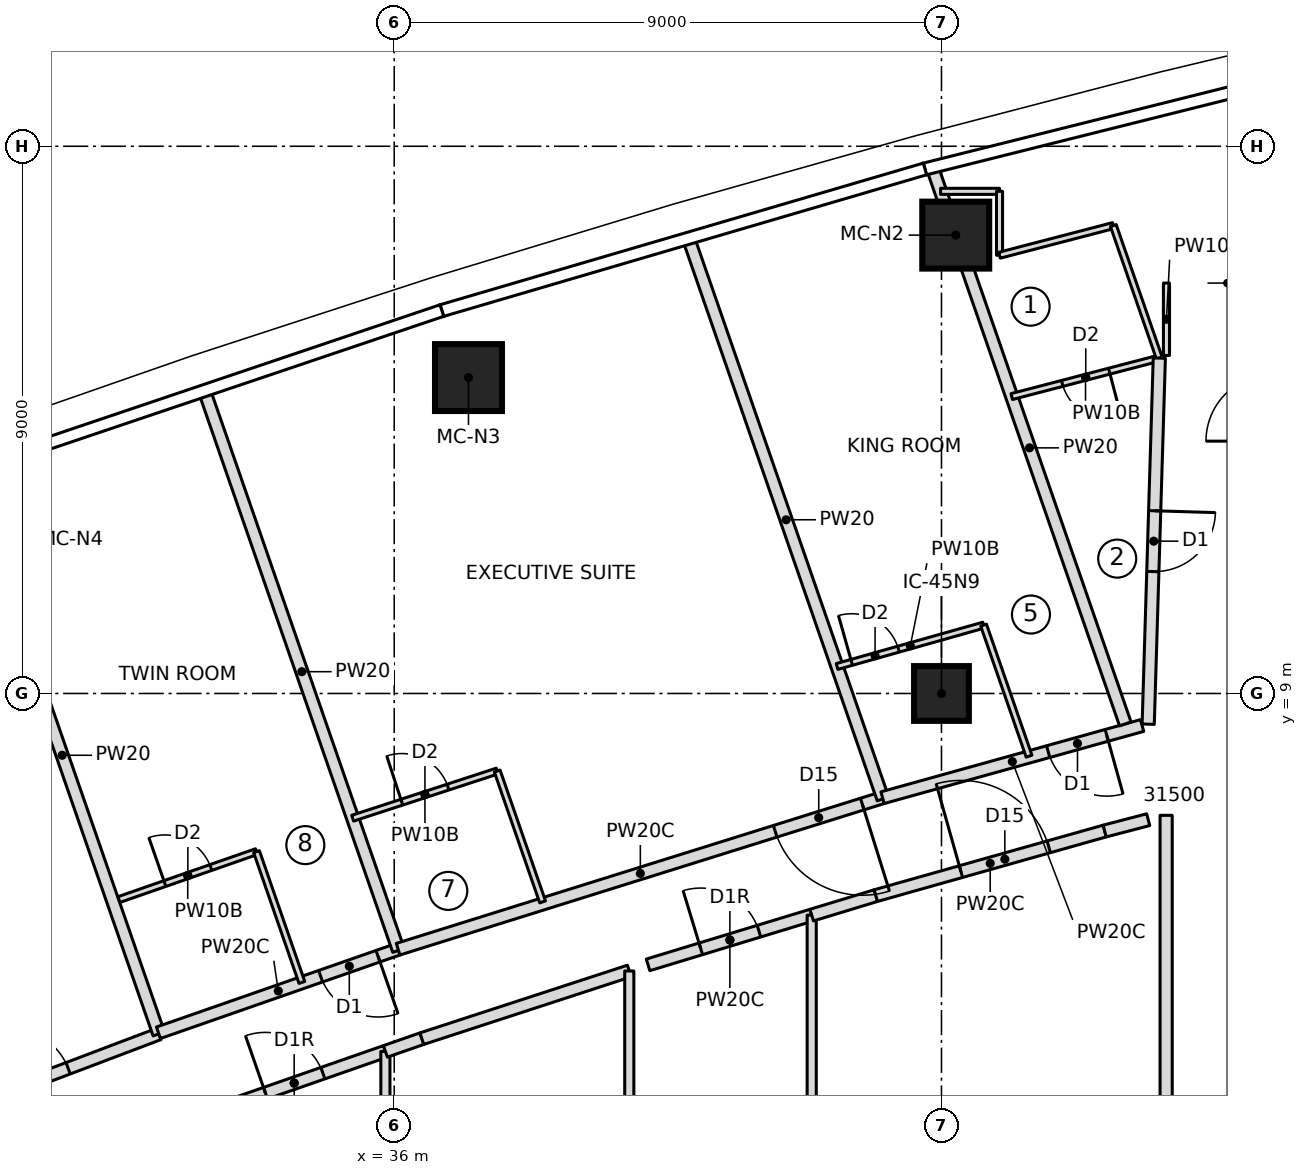
"""IFC4 building model, lengths in metres.
Left out: names, types, materials, properties, quantities, classifications, styles, units other than length and angle.
Written with IfcOpenShell. Run it as: python <this file> out.ifc"""

import sys

from ifc_helpers import new_model, si_unit, direction, frame, frame_2d, origin, origin_2d, place, context, subcontext, project, spatial, rectangle, extrude, element, fill, save


model = new_model("IFC4")
c1 = context("Model", 3, precision=1e-05, world=origin(), true_north=direction((0.0, 1.0)))
c2 = subcontext(c1, "Body", "Model", "MODEL_VIEW")
j1 = project(units=[si_unit("LENGTHUNIT", "METRE"), si_unit("PLANEANGLEUNIT", "RADIAN")], contexts=[c1])
p1 = place(None, origin())
s1 = spatial("IfcSite", under=j1, at=p1, CompositionType="ELEMENT")
p2 = place(p1, origin())
s2 = spatial("IfcBuilding", under=s1, at=p2, CompositionType="ELEMENT")
p3 = place(p2, frame((0.0, 0.0, 296.3)))
s3 = spatial("IfcBuildingStorey", under=s2, at=p3, CompositionType="ELEMENT", Elevation=296.3)
for number, where, z_axis, x_axis in (
    (1, (45.235, 16.539, 0.0), (0.0, 0.0, 1.0), (1.0, 0.0, 0.0)),
    (2, (37.221, 14.196, 0.0), (0.0, 0.0, 1.0), (1.0, 0.0, 0.0)),
):
    element("IfcColumn", number, at=place(p3, frame(where, z_axis=z_axis, x_axis=x_axis)), inside=s3, PredefinedType="COLUMN", context=c2, shape_type="SweptSolid", body=[
        extrude(rectangle(XDim=1.1, YDim=1.1, at=origin_2d()), origin(), (0.0, 0.0, 1.0), 3.55),
    ])
p4 = place(p3, frame((45.0, 9.0, 0.0), z_axis=(0.0, 0.0, 1.0), x_axis=(1.0, 0.0, 0.0)))
e3 = element("IfcColumn", 3, at=p4, inside=s3, PredefinedType="COLUMN", context=c2, shape_type="SweptSolid", body=[
    extrude(rectangle(XDim=0.9, YDim=0.9, at=origin_2d()), origin(), (0.0, 0.0, 1.0), 3.55),
])
p5 = place(p3, frame((26.85, 1.401, 0.0), z_axis=(0.0, 0.0, 1.0), x_axis=(0.935181367748, 0.354169181912, 0.0)))
e4 = element("IfcWall", 4, at=p5, inside=s3, PredefinedType="PARTITIONING", context=c2, shape_type="SweptSolid", body=[
    extrude(rectangle(XDim=5.645, YDim=0.2, at=frame_2d((2.823, 0.0))), origin(), (0.0, 0.0, 1.0), 3.25),
])
p6 = place(p5, frame((3.05, 0.0, 0.0)))
e5 = element("IfcOpeningElement", 5, at=p6, cuts=e4, PredefinedType="OPENING", context=c2, shape_type="SweptSolid", body=[
    extrude(rectangle(XDim=1.0, YDim=2.1, at=frame_2d((0.5, 1.05))), frame((0.0, 0.11, 0.0), z_axis=(0.0, -1.0, 0.0), x_axis=(1.0, 0.0, 0.0)), (0.0, 0.0, 1.0), 0.22),
])
p7 = place(p3, frame((32.129, 3.401, 0.0), z_axis=(0.0, 0.0, 1.0), x_axis=(-0.327724115377, 0.944773467134, 0.0)))
e6 = element("IfcWall", 6, at=p7, inside=s3, PredefinedType="PARTITIONING", context=c2, shape_type="SweptSolid", body=[
    extrude(rectangle(XDim=9.702, YDim=0.2, at=frame_2d((4.851, 0.0))), origin(), (0.0, 0.0, 1.0), 3.25),
])
p8 = place(p3, frame((36.064, 4.794, 0.0), z_axis=(0.0, 0.0, 1.0), x_axis=(-0.944236129554, -0.329269086986, 0.0)))
e7 = element("IfcWall", 7, at=p8, inside=s3, PredefinedType="PARTITIONING", context=c2, shape_type="SweptSolid", body=[
    extrude(rectangle(XDim=4.174, YDim=0.2, at=frame_2d((2.087, 0.0))), origin(), (0.0, 0.0, 1.0), 3.25),
])
p9 = place(p8, frame((0.35, 0.0, 0.0)))
e8 = element("IfcOpeningElement", 8, at=p9, cuts=e7, PredefinedType="OPENING", context=c2, shape_type="SweptSolid", body=[
    extrude(rectangle(XDim=1.0, YDim=2.1, at=frame_2d((0.5, 1.05))), frame((0.0, 0.11, 0.0), z_axis=(0.0, -1.0, 0.0), x_axis=(1.0, 0.0, 0.0)), (0.0, 0.0, 1.0), 0.22),
])
p10 = place(p3, frame((31.473, 5.611, 0.0), z_axis=(0.0, 0.0, 1.0), x_axis=(0.944305532659, 0.329069994059, 0.0)))
e9 = element("IfcWall", 9, at=p10, inside=s3, PredefinedType="PARTITIONING", context=c2, shape_type="SweptSolid", body=[
    extrude(rectangle(XDim=2.396, YDim=0.1, at=frame_2d((1.198, 0.0))), origin(), (0.0, 0.0, 1.0), 3.25),
])
p11 = place(p10, frame((0.8, 0.0, 0.0)))
e10 = element("IfcOpeningElement", 10, at=p11, cuts=e9, PredefinedType="OPENING", context=c2, shape_type="SweptSolid", body=[
    extrude(rectangle(XDim=0.8, YDim=2.1, at=frame_2d((0.4, 1.05))), frame((0.0, 0.06, 0.0), z_axis=(0.0, -1.0, 0.0), x_axis=(1.0, 0.0, 0.0)), (0.0, 0.0, 1.0), 0.12),
])
p12 = place(p3, frame((33.735, 6.399, 0.0), z_axis=(0.0, 0.0, 1.0), x_axis=(0.32768871219, -0.944785747089, 0.0)))
e11 = element("IfcWall", 11, at=p12, inside=s3, PredefinedType="PARTITIONING", context=c2, shape_type="SweptSolid", body=[
    extrude(rectangle(XDim=2.277, YDim=0.1, at=frame_2d((1.138, 0.0))), origin(), (0.0, 0.0, 1.0), 3.25),
])
p13 = place(p3, frame((36.071, 4.775, 0.0), z_axis=(0.0, 0.0, 1.0), x_axis=(-0.327725028322, 0.94477315045, 0.0)))
e12 = element("IfcWall", 12, at=p13, inside=s3, PredefinedType="PARTITIONING", context=c2, shape_type="SweptSolid", body=[
    extrude(rectangle(XDim=9.702, YDim=0.2, at=frame_2d((4.851, 0.0))), origin(), (0.0, 0.0, 1.0), 3.25),
])
p14 = place(p3, frame((44.031, 7.286, 0.0), z_axis=(0.0, 0.0, 1.0), x_axis=(-0.95441177989, -0.29849313963, 0.0)))
e13 = element("IfcWall", 13, at=p14, inside=s3, PredefinedType="PARTITIONING", context=c2, shape_type="SweptSolid", body=[
    extrude(rectangle(XDim=8.348, YDim=0.2, at=frame_2d((4.174, 0.0))), origin(), (0.0, 0.0, 1.0), 3.25),
])
p15 = place(p14, frame((0.35, 0.0, 0.0)))
e14 = element("IfcOpeningElement", 14, at=p15, cuts=e13, PredefinedType="OPENING", context=c2, shape_type="SweptSolid", body=[
    extrude(rectangle(XDim=1.5, YDim=2.1, at=frame_2d((0.75, 1.05))), frame((0.0, 0.11, 0.0), z_axis=(0.0, -1.0, 0.0), x_axis=(1.0, 0.0, 0.0)), (0.0, 0.0, 1.0), 0.22),
])
p16 = place(p3, frame((35.317, 6.948, 0.0), z_axis=(0.0, 0.0, 1.0), x_axis=(0.950666002187, 0.310216299194, 0.0)))
e15 = element("IfcWall", 15, at=p16, inside=s3, PredefinedType="PARTITIONING", context=c2, shape_type="SweptSolid", body=[
    extrude(rectangle(XDim=2.5, YDim=0.1, at=frame_2d((1.25, 0.0))), origin(), (0.0, 0.0, 1.0), 3.25),
])
p17 = place(p16, frame((0.85, 0.0, 0.0)))
e16 = element("IfcOpeningElement", 16, at=p17, cuts=e15, PredefinedType="OPENING", context=c2, shape_type="SweptSolid", body=[
    extrude(rectangle(XDim=0.8, YDim=2.1, at=frame_2d((0.4, 1.05))), frame((0.0, 0.06, 0.0), z_axis=(0.0, -1.0, 0.0), x_axis=(1.0, 0.0, 0.0)), (0.0, 0.0, 1.0), 0.12),
])
p18 = place(p3, frame((37.694, 7.724, 0.0), z_axis=(0.0, 0.0, 1.0), x_axis=(0.327622330203, -0.944808768351, 0.0)))
e17 = element("IfcWall", 17, at=p18, inside=s3, PredefinedType="PARTITIONING", context=c2, shape_type="SweptSolid", body=[
    extrude(rectangle(XDim=2.277, YDim=0.1, at=frame_2d((1.139, 0.0))), origin(), (0.0, 0.0, 1.0), 3.25),
])
p19 = place(p3, frame((44.038, 7.267, 0.0), z_axis=(0.0, 0.0, 1.0), x_axis=(-0.327714576096, 0.944776776077, 0.0)))
e18 = element("IfcWall", 18, at=p19, inside=s3, PredefinedType="PARTITIONING", context=c2, shape_type="SweptSolid", body=[
    extrude(rectangle(XDim=9.717, YDim=0.2, at=frame_2d((4.858, 0.0))), origin(), (0.0, 0.0, 1.0), 3.25),
])
p20 = place(p3, frame((48.299, 8.473, 0.0), z_axis=(0.0, 0.0, 1.0), x_axis=(-0.96343417102, -0.267945140115, 0.0)))
e19 = element("IfcWall", 19, at=p20, inside=s3, PredefinedType="PARTITIONING", context=c2, shape_type="SweptSolid", body=[
    extrude(rectangle(XDim=4.43, YDim=0.2, at=frame_2d((2.215, 0.0))), origin(), (0.0, 0.0, 1.0), 3.25),
])
p21 = place(p20, frame((0.603, 0.0, 0.0)))
e20 = element("IfcOpeningElement", 20, at=p21, cuts=e19, PredefinedType="OPENING", context=c2, shape_type="SweptSolid", body=[
    extrude(rectangle(XDim=1.0, YDim=2.1, at=frame_2d((0.5, 1.05))), frame((0.0, 0.11, 0.0), z_axis=(0.0, -1.0, 0.0), x_axis=(1.0, 0.0, 0.0)), (0.0, 0.0, 1.0), 0.22),
])
p22 = place(p3, frame((43.283, 9.444, 0.0), z_axis=(0.0, 0.0, 1.0), x_axis=(0.962409173596, 0.271603723424, 0.0)))
e21 = element("IfcWall", 21, at=p22, inside=s3, PredefinedType="PARTITIONING", context=c2, shape_type="SweptSolid", body=[
    extrude(rectangle(XDim=2.504, YDim=0.1, at=frame_2d((1.252, 0.0))), origin(), (0.0, 0.0, 1.0), 3.25),
])
p23 = place(p22, frame((0.25, 0.0, 0.0)))
e22 = element("IfcOpeningElement", 22, at=p23, cuts=e21, PredefinedType="OPENING", context=c2, shape_type="SweptSolid", body=[
    extrude(rectangle(XDim=0.8, YDim=2.1, at=frame_2d((0.4, 1.05))), frame((0.0, 0.06, 0.0), z_axis=(0.0, -1.0, 0.0), x_axis=(1.0, 0.0, 0.0)), (0.0, 0.0, 1.0), 0.12),
])
p24 = place(p3, frame((45.693, 10.124, 0.0), z_axis=(0.0, 0.0, 1.0), x_axis=(0.327764902685, -0.944759317799, 0.0)))
e23 = element("IfcWall", 23, at=p24, inside=s3, PredefinedType="PARTITIONING", context=c2, shape_type="SweptSolid", body=[
    extrude(rectangle(XDim=2.281, YDim=0.1, at=frame_2d((1.14, 0.0))), origin(), (0.0, 0.0, 1.0), 3.25),
])
p25 = place(p3, frame((48.023, 8.5, 0.0), z_axis=(0.0, 0.0, 1.0), x_axis=(-0.327705598625, 0.944779890043, 0.0)))
e24 = element("IfcWall", 24, at=p25, inside=s3, PredefinedType="PARTITIONING", context=c2, shape_type="SweptSolid", body=[
    extrude(rectangle(XDim=9.61, YDim=0.2, at=frame_2d((4.805, 0.0))), origin(), (0.0, 0.0, 1.0), 3.25),
])
p26 = place(p3, frame((48.583, 14.516, 0.0), z_axis=(0.0, 0.0, 1.0), x_axis=(-0.967665843663, -0.252235633897, 0.0)))
e25 = element("IfcWall", 25, at=p26, inside=s3, PredefinedType="PARTITIONING", context=c2, shape_type="SweptSolid", body=[
    extrude(rectangle(XDim=2.508, YDim=0.1, at=frame_2d((1.254, 0.0))), origin(), (0.0, 0.0, 1.0), 3.25),
])
p27 = place(p26, frame((0.85, 0.0, 0.0)))
e26 = element("IfcOpeningElement", 26, at=p27, cuts=e25, PredefinedType="OPENING", context=c2, shape_type="SweptSolid", body=[
    extrude(rectangle(XDim=0.8, YDim=2.1, at=frame_2d((0.4, 1.05))), frame((0.0, 0.06, 0.0), z_axis=(0.0, -1.0, 0.0), x_axis=(1.0, 0.0, 0.0)), (0.0, 0.0, 1.0), 0.12),
])
p28 = place(p3, frame((44.985, 17.259, 0.0), z_axis=(0.0, 0.0, 1.0), x_axis=(1.0, 0.0, 0.0)))
e27 = element("IfcWall", 27, at=p28, inside=s3, PredefinedType="PARTITIONING", context=c2, shape_type="SweptSolid", body=[
    extrude(rectangle(XDim=0.97, YDim=0.1, at=frame_2d((0.485, 0.0))), origin(), (0.0, 0.0, 1.0), 3.25),
])
p29 = place(p3, frame((45.955, 17.259, 0.0), z_axis=(0.0, 0.0, 1.0), x_axis=(0.0, -1.0, 0.0)))
e28 = element("IfcWall", 28, at=p29, inside=s3, PredefinedType="PARTITIONING", context=c2, shape_type="SweptSolid", body=[
    extrude(rectangle(XDim=1.051, YDim=0.1, at=frame_2d((0.525, 0.0))), origin(), (0.0, 0.0, 1.0), 3.25),
])
p30 = place(p3, frame((45.955, 16.208, 0.0), z_axis=(0.0, 0.0, 1.0), x_axis=(0.967650770907, 0.25229345129, 0.0)))
e29 = element("IfcWall", 29, at=p30, inside=s3, PredefinedType="PARTITIONING", context=c2, shape_type="SweptSolid", body=[
    extrude(rectangle(XDim=1.934, YDim=0.1, at=frame_2d((0.967, 0.0))), origin(), (0.0, 0.0, 1.0), 3.25),
])
p31 = place(p3, frame((47.826, 16.696, 0.0), z_axis=(0.0, 0.0, 1.0), x_axis=(0.327695604762, -0.944783356447, 0.0)))
e30 = element("IfcWall", 30, at=p31, inside=s3, PredefinedType="PARTITIONING", context=c2, shape_type="SweptSolid", body=[
    extrude(rectangle(XDim=2.307, YDim=0.1, at=frame_2d((1.154, 0.0))), origin(), (0.0, 0.0, 1.0), 3.25),
])
p32 = place(p3, frame((32.855, 2.068, 0.0), z_axis=(0.0, 0.0, 1.0), x_axis=(0.944260188635, 0.329200085296, 0.0)))
e31 = element("IfcWall", 31, at=p32, inside=s3, PredefinedType="PARTITIONING", context=c2, shape_type="SweptSolid", body=[
    extrude(rectangle(XDim=3.177, YDim=0.2, at=frame_2d((1.588, 0.0))), origin(), (0.0, 0.0, 1.0), 3.25),
])
p33 = place(p32, frame((1.088, 0.0, 0.0)))
e32 = element("IfcOpeningElement", 32, at=p33, cuts=e31, PredefinedType="OPENING", context=c2, shape_type="SweptSolid", body=[
    extrude(rectangle(XDim=1.0, YDim=2.1, at=frame_2d((0.5, 1.05))), frame((0.0, 0.11, 0.0), z_axis=(0.0, -1.0, 0.0), x_axis=(1.0, 0.0, 0.0)), (0.0, 0.0, 1.0), 0.22),
])
p34 = place(p3, frame((35.855, -3.114, 0.0), z_axis=(0.0, 0.0, 1.0), x_axis=(0.0, 1.0, 0.0)))
e33 = element("IfcWall", 33, at=p34, inside=s3, PredefinedType="PARTITIONING", context=c2, shape_type="SweptSolid", body=[
    extrude(rectangle(XDim=6.228, YDim=0.15, at=frame_2d((3.114, 0.0))), origin(), (0.0, 0.0, 1.0), 3.25),
])
p35 = place(p3, frame((35.855, 3.114, 0.0), z_axis=(0.0, 0.0, 1.0), x_axis=(0.944289130413, 0.329117058483, 0.0)))
e34 = element("IfcWall", 34, at=p35, inside=s3, PredefinedType="PARTITIONING", context=c2, shape_type="SweptSolid", body=[
    extrude(rectangle(XDim=0.635, YDim=0.2, at=frame_2d((0.317, 0.0))), origin(), (0.0, 0.0, 1.0), 3.25),
])
p36 = place(p3, frame((36.455, 3.323, 0.0), z_axis=(0.0, 0.0, 1.0), x_axis=(0.950718067733, 0.310056697535, 0.0)))
e35 = element("IfcWall", 35, at=p36, inside=s3, PredefinedType="PARTITIONING", context=c2, shape_type="SweptSolid", body=[
    extrude(rectangle(XDim=3.588, YDim=0.2, at=frame_2d((1.794, 0.0))), origin(), (0.0, 0.0, 1.0), 3.25),
])
p37 = place(p3, frame((39.866, -4.435, 0.0), z_axis=(0.0, 0.0, 1.0), x_axis=(0.0, 1.0, 0.0)))
e36 = element("IfcWall", 36, at=p37, inside=s3, PredefinedType="PARTITIONING", context=c2, shape_type="SweptSolid", body=[
    extrude(rectangle(XDim=8.871, YDim=0.15, at=frame_2d((4.435, 0.0))), origin(), (0.0, 0.0, 1.0), 3.25),
])
p38 = place(p3, frame((40.175, 4.536, 0.0), z_axis=(0.0, 0.0, 1.0), x_axis=(0.956742178936, 0.290937111838, 0.0)))
e37 = element("IfcWall", 37, at=p38, inside=s3, PredefinedType="PARTITIONING", context=c2, shape_type="SweptSolid", body=[
    extrude(rectangle(XDim=2.813, YDim=0.2, at=frame_2d((1.406, 0.0))), origin(), (0.0, 0.0, 1.0), 3.25),
])
p39 = place(p38, frame((0.906, 0.0, 0.0)))
e38 = element("IfcOpeningElement", 38, at=p39, cuts=e37, PredefinedType="OPENING", context=c2, shape_type="SweptSolid", body=[
    extrude(rectangle(XDim=1.0, YDim=2.1, at=frame_2d((0.5, 1.05))), frame((0.0, 0.11, 0.0), z_axis=(0.0, -1.0, 0.0), x_axis=(1.0, 0.0, 0.0)), (0.0, 0.0, 1.0), 0.22),
])
p40 = place(p3, frame((42.866, -5.354, 0.0), z_axis=(0.0, 0.0, 1.0), x_axis=(0.0, 1.0, 0.0)))
e39 = element("IfcWall", 39, at=p40, inside=s3, PredefinedType="PARTITIONING", context=c2, shape_type="SweptSolid", body=[
    extrude(rectangle(XDim=10.709, YDim=0.15, at=frame_2d((5.354, 0.0))), origin(), (0.0, 0.0, 1.0), 3.25),
])
p41 = place(p3, frame((43.918, 5.675, 0.0), z_axis=(0.0, 0.0, 1.0), x_axis=(0.962411212211, 0.271596499628, 0.0)))
e40 = element("IfcWall", 40, at=p41, inside=s3, PredefinedType="PARTITIONING", context=c2, shape_type="SweptSolid", body=[
    extrude(rectangle(XDim=3.913, YDim=0.2, at=frame_2d((1.957, 0.0))), origin(), (0.0, 0.0, 1.0), 3.25),
])
p42 = place(p41, frame((1.457, 0.0, 0.0)))
e41 = element("IfcOpeningElement", 41, at=p42, cuts=e40, PredefinedType="OPENING", context=c2, shape_type="SweptSolid", body=[
    extrude(rectangle(XDim=1.5, YDim=2.1, at=frame_2d((0.75, 1.05))), frame((0.0, 0.11, 0.0), z_axis=(0.0, -1.0, 0.0), x_axis=(1.0, 0.0, 0.0)), (0.0, 0.0, 1.0), 0.22),
])
p43 = place(p3, frame((42.866, 5.354, 0.0), z_axis=(0.0, 0.0, 1.0), x_axis=(0.956676567943, 0.291152785233, 0.0)))
e42 = element("IfcWall", 42, at=p43, inside=s3, PredefinedType="PARTITIONING", context=c2, shape_type="SweptSolid", body=[
    extrude(rectangle(XDim=1.1, YDim=0.2, at=frame_2d((0.55, 0.0))), origin(), (0.0, 0.0, 1.0), 3.25),
])
p44 = place(p3, frame((47.684, 6.738, 0.0), z_axis=(0.0, 0.0, 1.0), x_axis=(0.967585713416, 0.252542842294, 0.0)))
e43 = element("IfcWall", 43, at=p44, inside=s3, PredefinedType="PARTITIONING", context=c2, shape_type="SweptSolid", body=[
    extrude(rectangle(XDim=0.74, YDim=0.2, at=frame_2d((0.37, 0.0))), origin(), (0.0, 0.0, 1.0), 3.25),
])
p45 = place(p3, frame((48.583, 14.516, 0.0), z_axis=(0.0, 0.0, 1.0), x_axis=(-0.030318578026, -0.999540286245, 0.0)))
e44 = element("IfcWall", 44, at=p45, inside=s3, PredefinedType="PARTITIONING", context=c2, shape_type="SweptSolid", body=[
    extrude(rectangle(XDim=6.023, YDim=0.2, at=frame_2d((3.012, 0.0))), origin(), (0.0, 0.0, 1.0), 3.25),
])
p46 = place(p45, frame((2.512, 0.0, 0.0)))
e45 = element("IfcOpeningElement", 45, at=p46, cuts=e44, PredefinedType="OPENING", context=c2, shape_type="SweptSolid", body=[
    extrude(rectangle(XDim=1.0, YDim=2.1, at=frame_2d((0.5, 1.05))), frame((0.0, 0.11, 0.0), z_axis=(0.0, -1.0, 0.0), x_axis=(1.0, 0.0, 0.0)), (0.0, 0.0, 1.0), 0.22),
])
p47 = place(p3, frame((48.695, 6.996, 0.0), z_axis=(0.0, 0.0, 1.0), x_axis=(0.0, -1.0, 0.0)))
e46 = element("IfcWall", 46, at=p47, inside=s3, PredefinedType="PARTITIONING", context=c2, shape_type="SweptSolid", body=[
    extrude(rectangle(XDim=13.992, YDim=0.2, at=frame_2d((6.996, 0.0))), origin(), (0.0, 0.0, 1.0), 3.25),
])
p48 = place(p3, frame((48.7, 14.559, 0.0), z_axis=(0.0, 0.0, 1.0), x_axis=(0.0, 1.0, 0.0)))
e47 = element("IfcWall", 47, at=p48, inside=s3, PredefinedType="PARTITIONING", context=c2, shape_type="SweptSolid", body=[
    extrude(rectangle(XDim=1.191, YDim=0.1, at=frame_2d((0.595, 0.0))), origin(), (0.0, 0.0, 1.0), 3.25),
])
p49 = place(p6, origin())
e48 = element("IfcDoor", 48, at=p49, inside=s3, OperationType="SINGLE_SWING_LEFT", PredefinedType="DOOR", context=c2, shape_type="SweptSolid", body=[
    extrude(rectangle(XDim=1.0, YDim=2.1, at=frame_2d((0.5, 1.05))), frame((0.0, 0.025, 0.0), z_axis=(0.0, -1.0, 0.0), x_axis=(1.0, 0.0, 0.0)), (0.0, 0.0, 1.0), 0.05),
])
fill(e5, e48)
p50 = place(p11, origin())
e49 = element("IfcDoor", 49, at=p50, inside=s3, OperationType="SINGLE_SWING_LEFT", PredefinedType="DOOR", context=c2, shape_type="SweptSolid", body=[
    extrude(rectangle(XDim=0.8, YDim=2.1, at=frame_2d((0.4, 1.05))), frame((0.0, 0.025, 0.0), z_axis=(0.0, -1.0, 0.0), x_axis=(1.0, 0.0, 0.0)), (0.0, 0.0, 1.0), 0.05),
])
fill(e10, e49)
p51 = place(p9, origin())
e50 = element("IfcDoor", 50, at=p51, inside=s3, OperationType="SINGLE_SWING_LEFT", PredefinedType="DOOR", context=c2, shape_type="SweptSolid", body=[
    extrude(rectangle(XDim=1.0, YDim=2.1, at=frame_2d((0.5, 1.05))), frame((0.0, 0.025, 0.0), z_axis=(0.0, -1.0, 0.0), x_axis=(1.0, 0.0, 0.0)), (0.0, 0.0, 1.0), 0.05),
])
fill(e8, e50)
p52 = place(p17, origin())
e51 = element("IfcDoor", 51, at=p52, inside=s3, OperationType="SINGLE_SWING_LEFT", PredefinedType="DOOR", context=c2, shape_type="SweptSolid", body=[
    extrude(rectangle(XDim=0.8, YDim=2.1, at=frame_2d((0.4, 1.05))), frame((0.0, 0.025, 0.0), z_axis=(0.0, -1.0, 0.0), x_axis=(1.0, 0.0, 0.0)), (0.0, 0.0, 1.0), 0.05),
])
fill(e16, e51)
p53 = place(p15, origin())
e52 = element("IfcDoor", 52, at=p53, inside=s3, OperationType="DOUBLE_DOOR_SINGLE_SWING", PredefinedType="DOOR", context=c2, shape_type="SweptSolid", body=[
    extrude(rectangle(XDim=1.5, YDim=2.1, at=frame_2d((0.75, 1.05))), frame((0.0, 0.025, 0.0), z_axis=(0.0, -1.0, 0.0), x_axis=(1.0, 0.0, 0.0)), (0.0, 0.0, 1.0), 0.05),
])
fill(e14, e52)
p54 = place(p23, origin())
e53 = element("IfcDoor", 53, at=p54, inside=s3, OperationType="SINGLE_SWING_LEFT", PredefinedType="DOOR", context=c2, shape_type="SweptSolid", body=[
    extrude(rectangle(XDim=0.8, YDim=2.1, at=frame_2d((0.4, 1.05))), frame((0.0, 0.025, 0.0), z_axis=(0.0, -1.0, 0.0), x_axis=(1.0, 0.0, 0.0)), (0.0, 0.0, 1.0), 0.05),
])
fill(e22, e53)
p55 = place(p21, origin())
e54 = element("IfcDoor", 54, at=p55, inside=s3, OperationType="SINGLE_SWING_LEFT", PredefinedType="DOOR", context=c2, shape_type="SweptSolid", body=[
    extrude(rectangle(XDim=1.0, YDim=2.1, at=frame_2d((0.5, 1.05))), frame((0.0, 0.025, 0.0), z_axis=(0.0, -1.0, 0.0), x_axis=(1.0, 0.0, 0.0)), (0.0, 0.0, 1.0), 0.05),
])
fill(e20, e54)
p56 = place(p27, origin())
e55 = element("IfcDoor", 55, at=p56, inside=s3, OperationType="SINGLE_SWING_LEFT", PredefinedType="DOOR", context=c2, shape_type="SweptSolid", body=[
    extrude(rectangle(XDim=0.8, YDim=2.1, at=frame_2d((0.4, 1.05))), frame((0.0, 0.025, 0.0), z_axis=(0.0, -1.0, 0.0), x_axis=(1.0, 0.0, 0.0)), (0.0, 0.0, 1.0), 0.05),
])
fill(e26, e55)
p57 = place(p33, origin())
e56 = element("IfcDoor", 56, at=p57, inside=s3, OperationType="SINGLE_SWING_RIGHT", PredefinedType="DOOR", context=c2, shape_type="SweptSolid", body=[
    extrude(rectangle(XDim=1.0, YDim=2.1, at=frame_2d((0.5, 1.05))), frame((0.0, 0.025, 0.0), z_axis=(0.0, -1.0, 0.0), x_axis=(1.0, 0.0, 0.0)), (0.0, 0.0, 1.0), 0.05),
])
fill(e32, e56)
p58 = place(p39, origin())
e57 = element("IfcDoor", 57, at=p58, inside=s3, OperationType="SINGLE_SWING_RIGHT", PredefinedType="DOOR", context=c2, shape_type="SweptSolid", body=[
    extrude(rectangle(XDim=1.0, YDim=2.1, at=frame_2d((0.5, 1.05))), frame((0.0, 0.025, 0.0), z_axis=(0.0, -1.0, 0.0), x_axis=(1.0, 0.0, 0.0)), (0.0, 0.0, 1.0), 0.05),
])
fill(e38, e57)
p59 = place(p42, origin())
e58 = element("IfcDoor", 58, at=p59, inside=s3, OperationType="DOUBLE_DOOR_SINGLE_SWING", PredefinedType="DOOR", context=c2, shape_type="SweptSolid", body=[
    extrude(rectangle(XDim=1.5, YDim=2.1, at=frame_2d((0.75, 1.05))), frame((0.0, 0.025, 0.0), z_axis=(0.0, -1.0, 0.0), x_axis=(1.0, 0.0, 0.0)), (0.0, 0.0, 1.0), 0.05),
])
fill(e41, e58)
p60 = place(p46, origin())
e59 = element("IfcDoor", 59, at=p60, inside=s3, OperationType="SINGLE_SWING_LEFT", PredefinedType="DOOR", context=c2, shape_type="SweptSolid", body=[
    extrude(rectangle(XDim=1.0, YDim=2.1, at=frame_2d((0.5, 1.05))), frame((0.0, 0.025, 0.0), z_axis=(0.0, -1.0, 0.0), x_axis=(1.0, 0.0, 0.0)), (0.0, 0.0, 1.0), 0.05),
])
fill(e45, e59)
save(model, sys.argv[1])
